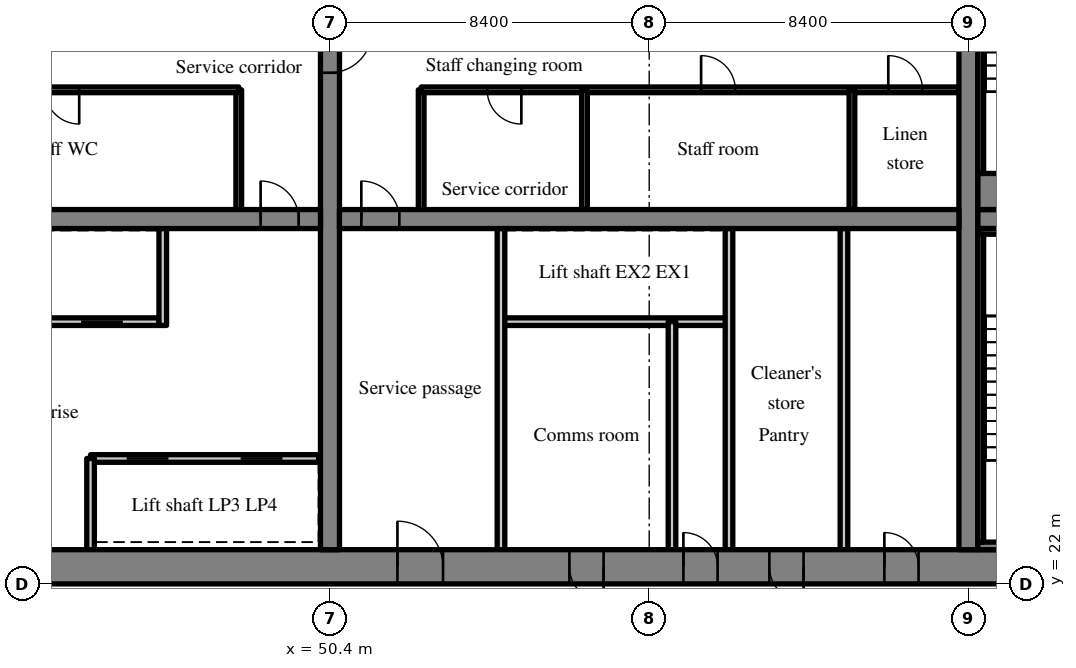
"""IFC4 building model, lengths in metres.
Left out: names, types, materials, properties, quantities, classifications, styles, units other than length and angle.
Written with IfcOpenShell. Run it as: python <this file> out.ifc"""

import sys

from ifc_helpers import new_model, si_unit, direction, frame, frame_2d, origin, place, context, subcontext, project, spatial, rectangle, extrude, source, transform, mapped, element, fill, save


model = new_model("IFC4")
c1 = context("Model", 3, precision=1e-05, world=origin(), true_north=direction((0.0, 1.0)))
c2 = subcontext(c1, "Body", "Model", "MODEL_VIEW")
j1 = project(units=[si_unit("LENGTHUNIT", "METRE"), si_unit("PLANEANGLEUNIT", "RADIAN")], contexts=[c1])
p1 = place(None, origin())
s1 = spatial("IfcSite", under=j1, at=p1, CompositionType="ELEMENT")
p2 = place(p1, origin())
s2 = spatial("IfcBuilding", under=s1, at=p2, CompositionType="ELEMENT")
p3 = place(p2, frame((0.0, 0.0, 86.4)))
s3 = spatial("IfcBuildingStorey", under=s2, at=p3, CompositionType="ELEMENT", Elevation=86.4)
m1 = source(origin(), c2, "Body", "SweptSolid", [
    extrude(rectangle(XDim=50.4, YDim=0.9, at=frame_2d((25.2, 0.0))), origin(), (0.0, 0.0, 1.0), 4.72),
])
p4 = place(p3, frame((25.2, 22.45, 0.0), z_axis=(0.0, 0.0, 1.0), x_axis=(1.0, 0.0, 0.0)))
e1 = element("IfcWall", 1, at=p4, inside=s3, PredefinedType="SHEAR", context=c2, shape_type="MappedRepresentation", body=[
    mapped(m1, transform((0.0, 0.0, 0.0), scale=1.0)),
])
m2 = source(origin(), c2, "Body", "SweptSolid", [
    extrude(rectangle(XDim=1.8, YDim=2.1, at=frame_2d((0.9, 1.05))), frame((0.0, 0.46, 0.0), z_axis=(0.0, -1.0, 0.0), x_axis=(1.0, 0.0, 0.0)), (0.0, 0.0, 1.0), 0.92),
])
p5 = place(p4, frame((15.9, 0.0, 0.0)))
e2 = element("IfcOpeningElement", 2, at=p5, cuts=e1, PredefinedType="OPENING", context=c2, shape_type="MappedRepresentation", body=[
    mapped(m2, transform((0.0, 0.0, 0.0), scale=1.0)),
])
m3 = source(origin(), c2, "Body", "SweptSolid", [
    extrude(rectangle(XDim=1.2, YDim=2.1, at=frame_2d((0.6, 1.05))), frame((0.0, 0.46, 0.0), z_axis=(0.0, -1.0, 0.0), x_axis=(1.0, 0.0, 0.0)), (0.0, 0.0, 1.0), 0.92),
])
p6 = place(p4, frame((26.975, 0.0, 0.0)))
e3 = element("IfcOpeningElement", 3, at=p6, cuts=e1, PredefinedType="OPENING", context=c2, shape_type="MappedRepresentation", body=[
    mapped(m3, transform((0.0, 0.0, 0.0), scale=1.0)),
])
m4 = source(origin(), c2, "Body", "SweptSolid", [
    extrude(rectangle(XDim=0.9, YDim=2.1, at=frame_2d((0.45, 1.05))), frame((0.0, 0.46, 0.0), z_axis=(0.0, -1.0, 0.0), x_axis=(1.0, 0.0, 0.0)), (0.0, 0.0, 1.0), 0.92),
])
p7 = place(p4, frame((34.5, 0.0, 0.0)))
e4 = element("IfcOpeningElement", 4, at=p7, cuts=e1, PredefinedType="OPENING", context=c2, shape_type="MappedRepresentation", body=[
    mapped(m4, transform((0.0, 0.0, 0.0), scale=1.0)),
])
p8 = place(p4, frame((31.5, 0.0, 0.0)))
e5 = element("IfcOpeningElement", 5, at=p8, cuts=e1, PredefinedType="OPENING", context=c2, shape_type="MappedRepresentation", body=[
    mapped(m4, transform((0.0, 0.0, 0.0), scale=1.0)),
])
p9 = place(p4, frame((39.788, 0.0, 0.0)))
e6 = element("IfcOpeningElement", 6, at=p9, cuts=e1, PredefinedType="OPENING", context=c2, shape_type="MappedRepresentation", body=[
    mapped(m4, transform((0.0, 0.0, 0.0), scale=1.0)),
])
p10 = place(p4, frame((36.762, 0.0, 0.0)))
e7 = element("IfcOpeningElement", 7, at=p10, cuts=e1, PredefinedType="OPENING", context=c2, shape_type="MappedRepresentation", body=[
    mapped(m4, transform((0.0, 0.0, 0.0), scale=1.0)),
])
p11 = place(p4, frame((6.45, 0.0, 0.0)))
e8 = element("IfcOpeningElement", 8, at=p11, cuts=e1, PredefinedType="OPENING", context=c2, shape_type="MappedRepresentation", body=[
    mapped(m3, transform((0.0, 0.0, 0.0), scale=1.0)),
])
p12 = place(p4, frame((47.775, 0.0, 0.0)))
e9 = element("IfcOpeningElement", 9, at=p12, cuts=e1, PredefinedType="OPENING", context=c2, shape_type="MappedRepresentation", body=[
    mapped(m3, transform((0.0, 0.0, 0.0), scale=1.0)),
])
m5 = source(origin(), c2, "Body", "SweptSolid", [
    extrude(rectangle(XDim=18.2, YDim=0.5, at=frame_2d((9.1, 0.0))), origin(), (0.0, 0.0, 1.0), 4.72),
])
p13 = place(p3, frame((50.4, 22.9, 0.0), z_axis=(0.0, 0.0, 1.0), x_axis=(0.0, 1.0, 0.0)))
e10 = element("IfcWall", 10, at=p13, inside=s3, PredefinedType="SHEAR", context=c2, shape_type="MappedRepresentation", body=[
    mapped(m5, transform((0.0, 0.0, 0.0), scale=1.0)),
])
m6 = source(origin(), c2, "Body", "SweptSolid", [
    extrude(rectangle(XDim=1.1, YDim=2.1, at=frame_2d((0.55, 1.05))), frame((0.0, 0.26, 0.0), z_axis=(0.0, -1.0, 0.0), x_axis=(1.0, 0.0, 0.0)), (0.0, 0.0, 1.0), 0.52),
])
p14 = place(p13, frame((12.55, 0.0, 0.0)))
e11 = element("IfcOpeningElement", 11, at=p14, cuts=e10, PredefinedType="OPENING", context=c2, shape_type="MappedRepresentation", body=[
    mapped(m6, transform((0.0, 0.0, 0.0), scale=1.0)),
])
p15 = place(p3, frame((67.2, 22.9, 0.0), z_axis=(0.0, 0.0, 1.0), x_axis=(0.0, 1.0, 0.0)))
e12 = element("IfcWall", 12, at=p15, inside=s3, PredefinedType="SHEAR", context=c2, shape_type="MappedRepresentation", body=[
    mapped(m5, transform((0.0, 0.0, 0.0), scale=1.0)),
])
m7 = source(origin(), c2, "Body", "SweptSolid", [
    extrude(rectangle(XDim=16.3, YDim=0.5, at=frame_2d((8.15, 0.0))), origin(), (0.0, 0.0, 1.0), 4.72),
])
p16 = place(p3, frame((33.85, 31.6, 0.0), z_axis=(0.0, 0.0, 1.0), x_axis=(1.0, 0.0, 0.0)))
e13 = element("IfcWall", 13, at=p16, inside=s3, PredefinedType="SHEAR", context=c2, shape_type="MappedRepresentation", body=[
    mapped(m7, transform((0.0, 0.0, 0.0), scale=1.0)),
])
m8 = source(origin(), c2, "Body", "SweptSolid", [
    extrude(rectangle(XDim=1.0, YDim=2.1, at=frame_2d((0.5, 1.05))), frame((0.0, 0.26, 0.0), z_axis=(0.0, -1.0, 0.0), x_axis=(1.0, 0.0, 0.0)), (0.0, 0.0, 1.0), 0.52),
])
p17 = place(p16, frame((14.725, 0.0, 0.0)))
e14 = element("IfcOpeningElement", 14, at=p17, cuts=e13, PredefinedType="OPENING", context=c2, shape_type="MappedRepresentation", body=[
    mapped(m8, transform((0.0, 0.0, 0.0), scale=1.0)),
])
m9 = source(origin(), c2, "Body", "SweptSolid", [
    extrude(rectangle(XDim=16.3, YDim=0.5, at=frame_2d((8.15, 0.0))), origin(), (0.0, 0.0, 1.0), 4.72),
])
p18 = place(p3, frame((50.65, 31.6, 0.0), z_axis=(0.0, 0.0, 1.0), x_axis=(1.0, 0.0, 0.0)))
e15 = element("IfcWall", 15, at=p18, inside=s3, PredefinedType="SHEAR", context=c2, shape_type="MappedRepresentation", body=[
    mapped(m9, transform((0.0, 0.0, 0.0), scale=1.0)),
])
p19 = place(p18, frame((0.575, 0.0, 0.0)))
e16 = element("IfcOpeningElement", 16, at=p19, cuts=e15, PredefinedType="OPENING", context=c2, shape_type="MappedRepresentation", body=[
    mapped(m8, transform((0.0, 0.0, 0.0), scale=1.0)),
])
m10 = source(origin(), c2, "Body", "SweptSolid", [
    extrude(rectangle(XDim=7.25, YDim=0.5, at=frame_2d((3.625, 0.0))), origin(), (0.0, 0.0, 1.0), 4.72),
])
p20 = place(p3, frame((67.45, 31.6, 0.0), z_axis=(0.0, 0.0, 1.0), x_axis=(1.0, 0.0, 0.0)))
e17 = element("IfcWall", 17, at=p20, inside=s3, PredefinedType="SHEAR", context=c2, shape_type="MappedRepresentation", body=[
    mapped(m10, transform((0.0, 0.0, 0.0), scale=1.0)),
])
p21 = place(p20, frame((5.575, 0.0, 0.0)))
e18 = element("IfcOpeningElement", 18, at=p21, cuts=e17, PredefinedType="OPENING", context=c2, shape_type="MappedRepresentation", body=[
    mapped(m6, transform((0.0, 0.0, 0.0), scale=1.0)),
])
m11 = source(origin(), c2, "Body", "SweptSolid", [
    extrude(rectangle(XDim=6.0, YDim=0.2, at=frame_2d((3.0, 0.0))), origin(), (0.0, 0.0, 1.0), 4.72),
])
p22 = place(p3, frame((44.1, 25.3, 0.0), z_axis=(0.0, 0.0, 1.0), x_axis=(1.0, 0.0, 0.0)))
e19 = element("IfcWall", 19, at=p22, inside=s3, PredefinedType="SOLIDWALL", context=c2, shape_type="MappedRepresentation", body=[
    mapped(m11, transform((0.0, 0.0, 0.0), scale=1.0)),
])
m12 = source(origin(), c2, "Body", "SweptSolid", [
    extrude(rectangle(XDim=1.1, YDim=2.1, at=frame_2d((0.55, 1.05))), frame((0.0, 0.11, 0.0), z_axis=(0.0, -1.0, 0.0), x_axis=(1.0, 0.0, 0.0)), (0.0, 0.0, 1.0), 0.22),
])
p23 = place(p22, frame((0.95, 0.0, 0.0)))
e20 = element("IfcOpeningElement", 20, at=p23, cuts=e19, PredefinedType="OPENING", context=c2, shape_type="MappedRepresentation", body=[
    mapped(m12, transform((0.0, 0.0, 0.0), scale=1.0)),
])
p24 = place(p22, frame((3.95, 0.0, 0.0)))
e21 = element("IfcOpeningElement", 21, at=p24, cuts=e19, PredefinedType="OPENING", context=c2, shape_type="MappedRepresentation", body=[
    mapped(m12, transform((0.0, 0.0, 0.0), scale=1.0)),
])
m13 = source(origin(), c2, "Body", "SweptSolid", [
    extrude(rectangle(XDim=12.05, YDim=0.2, at=frame_2d((6.025, 0.0))), origin(), (0.0, 0.0, 1.0), 4.72),
])
p25 = place(p3, frame((33.85, 28.9, 0.0), z_axis=(0.0, 0.0, 1.0), x_axis=(1.0, 0.0, 0.0)))
e22 = element("IfcWall", 22, at=p25, inside=s3, PredefinedType="SOLIDWALL", context=c2, shape_type="MappedRepresentation", body=[
    mapped(m13, transform((0.0, 0.0, 0.0), scale=1.0)),
])
p26 = place(p25, frame((1.0, 0.0, 0.0)))
e23 = element("IfcOpeningElement", 23, at=p26, cuts=e22, PredefinedType="OPENING", context=c2, shape_type="MappedRepresentation", body=[
    mapped(m12, transform((0.0, 0.0, 0.0), scale=1.0)),
])
p27 = place(p25, frame((4.0, 0.0, 0.0)))
e24 = element("IfcOpeningElement", 24, at=p27, cuts=e22, PredefinedType="OPENING", context=c2, shape_type="MappedRepresentation", body=[
    mapped(m12, transform((0.0, 0.0, 0.0), scale=1.0)),
])
p28 = place(p25, frame((7.0, 0.0, 0.0)))
e25 = element("IfcOpeningElement", 25, at=p28, cuts=e22, PredefinedType="OPENING", context=c2, shape_type="MappedRepresentation", body=[
    mapped(m12, transform((0.0, 0.0, 0.0), scale=1.0)),
])
p29 = place(p25, frame((10.0, 0.0, 0.0)))
e26 = element("IfcOpeningElement", 26, at=p29, cuts=e22, PredefinedType="OPENING", context=c2, shape_type="MappedRepresentation", body=[
    mapped(m12, transform((0.0, 0.0, 0.0), scale=1.0)),
])
m14 = source(origin(), c2, "Body", "SweptSolid", [
    extrude(rectangle(XDim=2.4, YDim=0.2, at=frame_2d((1.2, 0.0))), origin(), (0.0, 0.0, 1.0), 4.72),
])
p30 = place(p3, frame((44.1, 22.9, 0.0), z_axis=(0.0, 0.0, 1.0), x_axis=(0.0, 1.0, 0.0)))
e27 = element("IfcWall", 27, at=p30, inside=s3, PredefinedType="SOLIDWALL", context=c2, shape_type="MappedRepresentation", body=[
    mapped(m14, transform((0.0, 0.0, 0.0), scale=1.0)),
])
m15 = source(origin(), c2, "Body", "SweptSolid", [
    extrude(rectangle(XDim=2.55, YDim=0.2, at=frame_2d((1.275, 0.0))), origin(), (0.0, 0.0, 1.0), 4.72),
])
p31 = place(p3, frame((46.0, 28.8, 0.0), z_axis=(0.0, 0.0, 1.0), x_axis=(0.0, 1.0, 0.0)))
e28 = element("IfcWall", 28, at=p31, inside=s3, PredefinedType="SOLIDWALL", context=c2, shape_type="MappedRepresentation", body=[
    mapped(m15, transform((0.0, 0.0, 0.0), scale=1.0)),
])
m16 = source(origin(), c2, "Body", "SweptSolid", [
    extrude(rectangle(XDim=3.15, YDim=0.15, at=frame_2d((1.575, 0.0))), origin(), (0.0, 0.0, 1.0), 4.72),
])
p32 = place(p3, frame((48.0, 31.85, 0.0), z_axis=(0.0, 0.0, 1.0), x_axis=(0.0, 1.0, 0.0)))
e29 = element("IfcWall", 29, at=p32, inside=s3, PredefinedType="PARTITIONING", context=c2, shape_type="MappedRepresentation", body=[
    mapped(m16, transform((0.0, 0.0, 0.0), scale=1.0)),
])
m17 = source(origin(), c2, "Body", "SweptSolid", [
    extrude(rectangle(XDim=14.15, YDim=0.15, at=frame_2d((7.075, 0.0))), origin(), (0.0, 0.0, 1.0), 4.72),
])
p33 = place(p3, frame((33.85, 35.0, 0.0), z_axis=(0.0, 0.0, 1.0), x_axis=(1.0, 0.0, 0.0)))
e30 = element("IfcWall", 30, at=p33, inside=s3, PredefinedType="PARTITIONING", context=c2, shape_type="MappedRepresentation", body=[
    mapped(m17, transform((0.0, 0.0, 0.0), scale=1.0)),
])
m18 = source(origin(), c2, "Body", "SweptSolid", [
    extrude(rectangle(XDim=0.9, YDim=2.1, at=frame_2d((0.45, 1.05))), frame((0.0, 0.085, 0.0), z_axis=(0.0, -1.0, 0.0), x_axis=(1.0, 0.0, 0.0)), (0.0, 0.0, 1.0), 0.17),
])
p34 = place(p33, frame((2.013, 0.0, 0.0)))
e31 = element("IfcOpeningElement", 31, at=p34, cuts=e30, PredefinedType="OPENING", context=c2, shape_type="MappedRepresentation", body=[
    mapped(m18, transform((0.0, 0.0, 0.0), scale=1.0)),
])
p35 = place(p33, frame((9.051, 0.0, 0.0)))
e32 = element("IfcOpeningElement", 32, at=p35, cuts=e30, PredefinedType="OPENING", context=c2, shape_type="MappedRepresentation", body=[
    mapped(m18, transform((0.0, 0.0, 0.0), scale=1.0)),
])
p36 = place(p3, frame((60.9, 28.9, 0.0), z_axis=(0.0, 0.0, 1.0), x_axis=(-1.0, 0.0, 0.0)))
e33 = element("IfcWall", 33, at=p36, inside=s3, PredefinedType="SOLIDWALL", context=c2, shape_type="MappedRepresentation", body=[
    mapped(m11, transform((0.0, 0.0, 0.0), scale=1.0)),
])
m19 = source(origin(), c2, "Body", "SweptSolid", [
    extrude(rectangle(XDim=8.45, YDim=0.2, at=frame_2d((4.225, 0.0))), origin(), (0.0, 0.0, 1.0), 4.72),
])
for number, where, z_axis, x_axis in (
    (34, (54.9, 22.9, 0.0), (0.0, 0.0, 1.0), (0.0, 1.0, 0.0)),
    (35, (60.9, 22.9, 0.0), (0.0, 0.0, 1.0), (0.0, 1.0, 0.0)),
):
    element("IfcWall", number, at=place(p3, frame(where, z_axis=z_axis, x_axis=x_axis)), inside=s3, PredefinedType="PARTITIONING", context=c2, shape_type="MappedRepresentation", body=[
        mapped(m19, transform((0.0, 0.0, 0.0), scale=1.0)),
    ])
p37 = place(p3, frame((59.4, 22.9, 0.0), z_axis=(0.0, 0.0, 1.0), x_axis=(0.0, 1.0, 0.0)))
e36 = element("IfcWall", 36, at=p37, inside=s3, PredefinedType="PARTITIONING", context=c2, shape_type="MappedRepresentation", body=[
    mapped(m11, transform((0.0, 0.0, 0.0), scale=1.0)),
])
p38 = place(p3, frame((63.925, 22.9, 0.0), z_axis=(0.0, 0.0, 1.0), x_axis=(0.0, 1.0, 0.0)))
e37 = element("IfcWall", 37, at=p38, inside=s3, PredefinedType="PARTITIONING", context=c2, shape_type="MappedRepresentation", body=[
    mapped(m19, transform((0.0, 0.0, 0.0), scale=1.0)),
])
p39 = place(p3, frame((52.8, 31.85, 0.0), z_axis=(0.0, 0.0, 1.0), x_axis=(0.0, 1.0, 0.0)))
e38 = element("IfcWall", 38, at=p39, inside=s3, PredefinedType="PARTITIONING", context=c2, shape_type="MappedRepresentation", body=[
    mapped(m16, transform((0.0, 0.0, 0.0), scale=1.0)),
])
p40 = place(p3, frame((66.95, 35.0, 0.0), z_axis=(0.0, 0.0, 1.0), x_axis=(-1.0, 0.0, 0.0)))
e39 = element("IfcWall", 39, at=p40, inside=s3, PredefinedType="PARTITIONING", context=c2, shape_type="MappedRepresentation", body=[
    mapped(m17, transform((0.0, 0.0, 0.0), scale=1.0)),
])
p41 = place(p40, frame((0.958, 0.0, 0.0)))
e40 = element("IfcOpeningElement", 40, at=p41, cuts=e39, PredefinedType="OPENING", context=c2, shape_type="MappedRepresentation", body=[
    mapped(m18, transform((0.0, 0.0, 0.0), scale=1.0)),
])
p42 = place(p40, frame((5.884, 0.0, 0.0)))
e41 = element("IfcOpeningElement", 41, at=p42, cuts=e39, PredefinedType="OPENING", context=c2, shape_type="MappedRepresentation", body=[
    mapped(m18, transform((0.0, 0.0, 0.0), scale=1.0)),
])
p43 = place(p40, frame((11.514, 0.0, 0.0)))
e42 = element("IfcOpeningElement", 42, at=p43, cuts=e39, PredefinedType="OPENING", context=c2, shape_type="MappedRepresentation", body=[
    mapped(m18, transform((0.0, 0.0, 0.0), scale=1.0)),
])
for number, where, z_axis, x_axis in (
    (43, (64.135, 31.85, 0.0), (0.0, 0.0, 1.0), (0.0, 1.0, 0.0)),
    (44, (57.097, 31.85, 0.0), (0.0, 0.0, 1.0), (0.0, 1.0, 0.0)),
):
    element("IfcWall", number, at=place(p3, frame(where, z_axis=z_axis, x_axis=x_axis)), inside=s3, PredefinedType="PARTITIONING", context=c2, shape_type="MappedRepresentation", body=[
        mapped(m16, transform((0.0, 0.0, 0.0), scale=1.0)),
    ])
m20 = source(origin(), c2, "Body", "SweptSolid", [
    extrude(rectangle(XDim=4.8, YDim=0.2, at=frame_2d((2.4, 0.0))), origin(), (0.0, 0.0, 1.0), 4.72),
])
p44 = place(p3, frame((67.45, 23.0, 0.0), z_axis=(0.0, 0.0, 1.0), x_axis=(1.0, 0.0, 0.0)))
e45 = element("IfcWall", 45, at=p44, inside=s3, PredefinedType="SOLIDWALL", context=c2, shape_type="MappedRepresentation", body=[
    mapped(m20, transform((0.0, 0.0, 0.0), scale=1.0)),
])
m21 = source(origin(), c2, "Body", "SweptSolid", [
    extrude(rectangle(XDim=4.8, YDim=0.15, at=frame_2d((2.4, 0.0))), origin(), (0.0, 0.0, 1.0), 4.72),
])
p45 = place(p3, frame((67.45, 31.275, 0.0), z_axis=(0.0, 0.0, 1.0), x_axis=(1.0, 0.0, 0.0)))
e46 = element("IfcWall", 46, at=p45, inside=s3, PredefinedType="SOLIDWALL", context=c2, shape_type="MappedRepresentation", body=[
    mapped(m21, transform((0.0, 0.0, 0.0), scale=1.0)),
])
m22 = source(origin(), c2, "Body", "SweptSolid", [
    extrude(rectangle(XDim=8.1, YDim=0.15, at=frame_2d((4.05, 0.0))), origin(), (0.0, 0.0, 1.0), 4.72),
])
p46 = place(p3, frame((67.525, 23.1, 0.0), z_axis=(0.0, 0.0, 1.0), x_axis=(0.0, 1.0, 0.0)))
e47 = element("IfcWall", 47, at=p46, inside=s3, PredefinedType="SOLIDWALL", context=c2, shape_type="MappedRepresentation", body=[
    mapped(m22, transform((0.0, 0.0, 0.0), scale=1.0)),
])
m23 = source(origin(), c2, "Body", "SweptSolid", [
    extrude(rectangle(XDim=4.8, YDim=0.95, at=frame_2d((2.4, 0.0))), origin(), (0.0, 0.0, 1.0), 4.72),
])
p47 = place(p3, frame((67.45, 32.325, 0.0), z_axis=(0.0, 0.0, 1.0), x_axis=(1.0, 0.0, 0.0)))
e48 = element("IfcWall", 48, at=p47, inside=s3, PredefinedType="SOLIDWALL", context=c2, shape_type="MappedRepresentation", body=[
    mapped(m23, transform((0.0, 0.0, 0.0), scale=1.0)),
])
p48 = place(p3, frame((67.525, 32.8, 0.0), z_axis=(0.0, 0.0, 1.0), x_axis=(0.0, 1.0, 0.0)))
e49 = element("IfcWall", 49, at=p48, inside=s3, PredefinedType="SOLIDWALL", context=c2, shape_type="MappedRepresentation", body=[
    mapped(m22, transform((0.0, 0.0, 0.0), scale=1.0)),
])
m24 = source(origin(), c2, "Body", "SweptSolid", [
    extrude(rectangle(XDim=1.0, YDim=2.1, at=frame_2d((0.5, 1.05))), frame((0.0, 0.025, 0.0), z_axis=(0.0, -1.0, 0.0), x_axis=(1.0, 0.0, 0.0)), (0.0, 0.0, 1.0), 0.05),
])
p49 = place(p17, origin())
e50 = element("IfcDoor", 50, at=p49, inside=s3, OperationType="SINGLE_SWING_LEFT", PredefinedType="DOOR", context=c2, shape_type="MappedRepresentation", body=[
    mapped(m24, transform((0.0, 0.0, 0.0), scale=1.0)),
])
fill(e14, e50)
m25 = source(origin(), c2, "Body", "SweptSolid", [
    extrude(rectangle(XDim=1.1, YDim=2.1, at=frame_2d((0.55, 1.05))), frame((0.0, 0.025, 0.0), z_axis=(0.0, -1.0, 0.0), x_axis=(1.0, 0.0, 0.0)), (0.0, 0.0, 1.0), 0.05),
])
p50 = place(p23, origin())
e51 = element("IfcDoor", 51, at=p50, inside=s3, OperationType="SLIDING_TO_LEFT", PredefinedType="DOOR", context=c2, shape_type="MappedRepresentation", body=[
    mapped(m25, transform((0.0, 0.0, 0.0), scale=1.0)),
])
fill(e20, e51)
p51 = place(p24, origin())
e52 = element("IfcDoor", 52, at=p51, inside=s3, OperationType="SLIDING_TO_RIGHT", PredefinedType="DOOR", context=c2, shape_type="MappedRepresentation", body=[
    mapped(m25, transform((0.0, 0.0, 0.0), scale=1.0)),
])
fill(e21, e52)
p52 = place(p29, origin())
e53 = element("IfcDoor", 53, at=p52, inside=s3, OperationType="SLIDING_TO_RIGHT", PredefinedType="DOOR", context=c2, shape_type="MappedRepresentation", body=[
    mapped(m25, transform((0.0, 0.0, 0.0), scale=1.0)),
])
fill(e26, e53)
m26 = source(origin(), c2, "Body", "SweptSolid", [
    extrude(rectangle(XDim=0.9, YDim=2.1, at=frame_2d((0.45, 1.05))), frame((0.0, 0.025, 0.0), z_axis=(0.0, -1.0, 0.0), x_axis=(1.0, 0.0, 0.0)), (0.0, 0.0, 1.0), 0.05),
])
p53 = place(p35, origin())
e54 = element("IfcDoor", 54, at=p53, inside=s3, OperationType="SINGLE_SWING_RIGHT", PredefinedType="DOOR", context=c2, shape_type="MappedRepresentation", body=[
    mapped(m26, transform((0.0, 0.0, 0.0), scale=1.0)),
])
fill(e32, e54)
m27 = source(origin(), c2, "Body", "SweptSolid", [
    extrude(rectangle(XDim=1.2, YDim=2.1, at=frame_2d((0.6, 1.05))), frame((0.0, 0.375, 0.0), z_axis=(0.0, -1.0, 0.0), x_axis=(1.0, 0.0, 0.0)), (0.0, 0.0, 1.0), 0.05),
])
p54 = place(p6, origin())
e55 = element("IfcDoor", 55, at=p54, inside=s3, OperationType="SINGLE_SWING_LEFT", PredefinedType="DOOR", context=c2, shape_type="MappedRepresentation", body=[
    mapped(m27, transform((0.0, 0.0, 0.0), scale=1.0)),
])
fill(e3, e55)
p55 = place(p19, origin())
e56 = element("IfcDoor", 56, at=p55, inside=s3, OperationType="SINGLE_SWING_LEFT", PredefinedType="DOOR", context=c2, shape_type="MappedRepresentation", body=[
    mapped(m24, transform((0.0, 0.0, 0.0), scale=1.0)),
])
fill(e16, e56)
m28 = source(origin(), c2, "Body", "SweptSolid", [
    extrude(rectangle(XDim=0.9, YDim=2.1, at=frame_2d((0.45, 1.05))), frame((0.0, 0.375, 0.0), z_axis=(0.0, -1.0, 0.0), x_axis=(1.0, 0.0, 0.0)), (0.0, 0.0, 1.0), 0.05),
])
p56 = place(p7, origin())
e57 = element("IfcDoor", 57, at=p56, inside=s3, OperationType="SINGLE_SWING_LEFT", PredefinedType="DOOR", context=c2, shape_type="MappedRepresentation", body=[
    mapped(m28, transform((0.0, 0.0, 0.0), scale=1.0)),
])
fill(e4, e57)
p57 = place(p8, origin())
e58 = element("IfcDoor", 58, at=p57, inside=s3, OperationType="SINGLE_SWING_RIGHT", PredefinedType="DOOR", context=c2, shape_type="MappedRepresentation", body=[
    mapped(m28, transform((0.0, 0.0, 0.0), scale=1.0)),
])
fill(e5, e58)
p58 = place(p9, origin())
e59 = element("IfcDoor", 59, at=p58, inside=s3, OperationType="SINGLE_SWING_LEFT", PredefinedType="DOOR", context=c2, shape_type="MappedRepresentation", body=[
    mapped(m28, transform((0.0, 0.0, 0.0), scale=1.0)),
])
fill(e6, e59)
p59 = place(p10, origin())
e60 = element("IfcDoor", 60, at=p59, inside=s3, OperationType="SINGLE_SWING_RIGHT", PredefinedType="DOOR", context=c2, shape_type="MappedRepresentation", body=[
    mapped(m28, transform((0.0, 0.0, 0.0), scale=1.0)),
])
fill(e7, e60)
p60 = place(p41, origin())
e61 = element("IfcDoor", 61, at=p60, inside=s3, OperationType="SINGLE_SWING_RIGHT", PredefinedType="DOOR", context=c2, shape_type="MappedRepresentation", body=[
    mapped(m26, transform((0.0, 0.0, 0.0), scale=1.0)),
])
fill(e40, e61)
p61 = place(p42, origin())
e62 = element("IfcDoor", 62, at=p61, inside=s3, OperationType="SINGLE_SWING_RIGHT", PredefinedType="DOOR", context=c2, shape_type="MappedRepresentation", body=[
    mapped(m26, transform((0.0, 0.0, 0.0), scale=1.0)),
])
fill(e41, e62)
p62 = place(p43, origin())
e63 = element("IfcDoor", 63, at=p62, inside=s3, OperationType="SINGLE_SWING_LEFT", PredefinedType="DOOR", context=c2, shape_type="MappedRepresentation", body=[
    mapped(m26, transform((0.0, 0.0, 0.0), scale=1.0)),
])
fill(e42, e63)
p63 = place(p14, origin())
e64 = element("IfcDoor", 64, at=p63, inside=s3, OperationType="SINGLE_SWING_RIGHT", PredefinedType="DOOR", context=c2, shape_type="MappedRepresentation", body=[
    mapped(m25, transform((0.0, 0.0, 0.0), scale=1.0)),
])
fill(e11, e64)
save(model, sys.argv[1])
